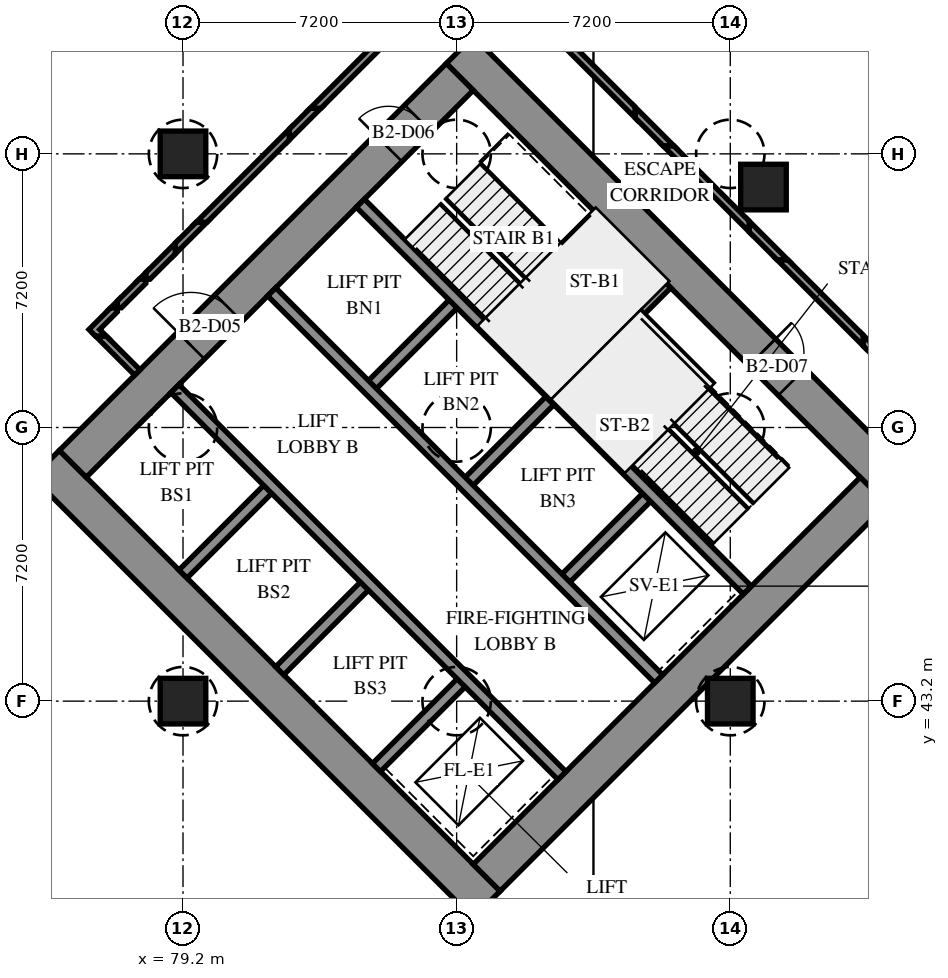
"""IFC4 building model, lengths in metres.
Left out: names, types, materials, properties, quantities, classifications, styles, units other than length and angle.
Written with IfcOpenShell. Run it as: python <this file> out.ifc"""

import sys

from ifc_helpers import new_model, si_unit, direction, frame, frame_2d, origin, origin_2d, place, context, subcontext, project, spatial, polyline, rectangle, outline, extrude, element, fill, save


model = new_model("IFC4")
c1 = context("Model", 3, precision=1e-05, world=origin(), true_north=direction((0.0, 1.0)))
c2 = subcontext(c1, "Body", "Model", "MODEL_VIEW")
j1 = project(units=[si_unit("LENGTHUNIT", "METRE"), si_unit("PLANEANGLEUNIT", "RADIAN")], contexts=[c1])
p1 = place(None, origin())
s1 = spatial("IfcSite", under=j1, at=p1, CompositionType="ELEMENT")
p2 = place(p1, origin())
s2 = spatial("IfcBuilding", under=s1, at=p2, CompositionType="ELEMENT")
p3 = place(p2, frame((0.0, 0.0, -9.0)))
s3 = spatial("IfcBuildingStorey", under=s2, at=p3, CompositionType="ELEMENT", Elevation=-9.0)
p4 = place(p3, frame((0.0, 0.0, -0.3)))
e1 = element("IfcWall", 1, at=p4, inside=s3, PredefinedType="SOLIDWALL", context=c2, shape_type="SweptSolid", body=[
    extrude(outline(polyline([(125.02, 34.665), (81.685, 78.0), (81.934, 78.6), (125.869, 34.665), (125.02, 34.665)])), origin(), (0.0, 0.0, 1.0), 4.5),
])
for number, where, z_axis, x_axis in (
    (2, (79.2, 43.2, 0.0), (0.0, 0.0, 1.0), (1.0, 0.0, 0.0)),
    (3, (79.2, 57.6, 0.0), (0.0, 0.0, 1.0), (1.0, 0.0, 0.0)),
    (4, (94.474, 56.727, 0.0), (0.0, 0.0, 1.0), (1.0, 0.0, 0.0)),
    (5, (93.6, 43.2, 0.0), (0.0, 0.0, 1.0), (1.0, 0.0, 0.0)),
):
    element("IfcColumn", number, at=place(p3, frame(where, z_axis=z_axis, x_axis=x_axis)), inside=s3, PredefinedType="COLUMN", context=c2, shape_type="SweptSolid", body=[
        extrude(rectangle(XDim=1.2, YDim=1.2, at=origin_2d()), origin(), (0.0, 0.0, 1.0), 4.2),
    ])
p5 = place(p3, frame((75.594, 49.443, -0.3), z_axis=(0.0, 0.0, 1.0), x_axis=(0.7071037324, -0.70710983, 0.0)))
e6 = element("IfcWall", 6, at=p5, inside=s3, PredefinedType="SHEAR", context=c2, shape_type="SweptSolid", body=[
    extrude(rectangle(XDim=16.4, YDim=1.0, at=frame_2d((8.2, 0.0))), origin(), (0.0, 0.0, 1.0), 3.8),
])
p6 = place(p3, frame((86.483, 60.333, -0.3), z_axis=(0.0, 0.0, 1.0), x_axis=(0.70710983, -0.7071037324, 0.0)))
e7 = element("IfcWall", 7, at=p6, inside=s3, PredefinedType="SHEAR", context=c2, shape_type="SweptSolid", body=[
    extrude(rectangle(XDim=16.4, YDim=1.0, at=frame_2d((8.2, 0.0))), origin(), (0.0, 0.0, 1.0), 3.8),
])
p7 = place(p6, frame((11.25, 0.0, 0.3)))
e8 = element("IfcOpeningElement", 8, at=p7, cuts=e7, PredefinedType="OPENING", context=c2, shape_type="SweptSolid", body=[
    extrude(rectangle(XDim=1.1, YDim=2.1, at=frame_2d((0.55, 1.05))), frame((0.0, 0.51, 0.0), z_axis=(0.0, -1.0, 0.0), x_axis=(1.0, 0.0, 0.0)), (0.0, 0.0, 1.0), 1.02),
])
p8 = place(p3, frame((76.301, 49.443, -0.3), z_axis=(0.0, 0.0, 1.0), x_axis=(0.7071067812, 0.7071067812, 0.0)))
e9 = element("IfcWall", 9, at=p8, inside=s3, PredefinedType="SHEAR", context=c2, shape_type="SweptSolid", body=[
    extrude(rectangle(XDim=14.4, YDim=1.0, at=frame_2d((7.2, 0.0))), origin(), (0.0, 0.0, 1.0), 3.8),
])
p9 = place(p8, frame((4.4, 0.0, 0.3)))
e10 = element("IfcOpeningElement", 10, at=p9, cuts=e9, PredefinedType="OPENING", context=c2, shape_type="SweptSolid", body=[
    extrude(rectangle(XDim=1.4, YDim=2.1, at=frame_2d((0.7, 1.05))), frame((0.0, 0.51, 0.0), z_axis=(0.0, -1.0, 0.0), x_axis=(1.0, 0.0, 0.0)), (0.0, 0.0, 1.0), 1.02),
])
p10 = place(p8, frame((11.75, 0.0, 0.3)))
e11 = element("IfcOpeningElement", 11, at=p10, cuts=e9, PredefinedType="OPENING", context=c2, shape_type="SweptSolid", body=[
    extrude(rectangle(XDim=1.1, YDim=2.1, at=frame_2d((0.55, 1.05))), frame((0.0, 0.51, 0.0), z_axis=(0.0, -1.0, 0.0), x_axis=(1.0, 0.0, 0.0)), (0.0, 0.0, 1.0), 1.02),
])
p11 = place(p3, frame((87.19, 38.554, -0.3), z_axis=(0.0, 0.0, 1.0), x_axis=(0.707103309, 0.7071102534, 0.0)))
e12 = element("IfcWall", 12, at=p11, inside=s3, PredefinedType="SHEAR", context=c2, shape_type="SweptSolid", body=[
    extrude(rectangle(XDim=14.4, YDim=1.0, at=frame_2d((7.2, 0.0))), origin(), (0.0, 0.0, 1.0), 3.8),
])
for number, where, z_axis, x_axis in (
    (13, (79.2, 46.544, 0.0), (0.0, 0.0, 1.0), (0.707, 0.707, 0.0)),
    (14, (84.079, 51.423, 0.0), (0.0, 0.0, 1.0), (0.707, 0.707, 0.0)),
):
    element("IfcWall", number, at=place(p3, frame(where, z_axis=z_axis, x_axis=x_axis)), inside=s3, PredefinedType="SOLIDWALL", context=c2, shape_type="SweptSolid", body=[
        extrude(rectangle(XDim=3.3, YDim=0.3, at=frame_2d((1.65, 0.0))), origin(), (0.0, 0.0, 1.0), 4.2),
    ])
p12 = place(p3, frame((81.746, 43.999, 0.0), z_axis=(0.0, 0.0, 1.0), x_axis=(0.7071067812, 0.7071067812, 0.0)))
e15 = element("IfcWall", 15, at=p12, inside=s3, PredefinedType="SOLIDWALL", context=c2, shape_type="SweptSolid", body=[
    extrude(rectangle(XDim=3.3, YDim=0.3, at=frame_2d((1.65, 0.0))), origin(), (0.0, 0.0, 1.0), 4.2),
])
p13 = place(p3, frame((86.625, 48.878, 0.0), z_axis=(0.0, 0.0, 1.0), x_axis=(0.7071067812, 0.7071067812, 0.0)))
e16 = element("IfcWall", 16, at=p13, inside=s3, PredefinedType="SOLIDWALL", context=c2, shape_type="SweptSolid", body=[
    extrude(rectangle(XDim=3.3, YDim=0.3, at=frame_2d((1.65, 0.0))), origin(), (0.0, 0.0, 1.0), 4.2),
])
p14 = place(p3, frame((84.291, 41.453, 0.0), z_axis=(0.0, 0.0, 1.0), x_axis=(0.7071067812, 0.7071067812, 0.0)))
e17 = element("IfcWall", 17, at=p14, inside=s3, PredefinedType="SOLIDWALL", context=c2, shape_type="SweptSolid", body=[
    extrude(rectangle(XDim=3.3, YDim=0.3, at=frame_2d((1.65, 0.0))), origin(), (0.0, 0.0, 1.0), 4.2),
])
p15 = place(p3, frame((89.17, 46.332, 0.0), z_axis=(0.0, 0.0, 1.0), x_axis=(0.7071067812, 0.7071067812, 0.0)))
e18 = element("IfcWall", 18, at=p15, inside=s3, PredefinedType="SOLIDWALL", context=c2, shape_type="SweptSolid", body=[
    extrude(rectangle(XDim=3.3, YDim=0.3, at=frame_2d((1.65, 0.0))), origin(), (0.0, 0.0, 1.0), 4.2),
])
p16 = place(p3, frame((78.988, 51.423, 0.0), z_axis=(0.0, 0.0, 1.0), x_axis=(0.7071067812, -0.7071067812, 0.0)))
e19 = element("IfcWall", 19, at=p16, inside=s3, PredefinedType="SOLIDWALL", context=c2, shape_type="SweptSolid", body=[
    extrude(rectangle(XDim=14.4, YDim=0.3, at=frame_2d((7.2, 0.0))), origin(), (0.0, 0.0, 1.0), 4.2),
])
p17 = place(p3, frame((81.534, 53.969, 0.0), z_axis=(0.0, 0.0, 1.0), x_axis=(0.707103309, -0.7071102534, 0.0)))
e20 = element("IfcWall", 20, at=p17, inside=s3, PredefinedType="SOLIDWALL", context=c2, shape_type="SweptSolid", body=[
    extrude(rectangle(XDim=14.4, YDim=0.3, at=frame_2d((7.2, 0.0))), origin(), (0.0, 0.0, 1.0), 4.2),
])
for number, where, z_axis, x_axis in (
    (21, (83.867, 56.302, 0.0), (0.0, 0.0, 1.0), (0.707, -0.707, 0.0)),
    (22, (88.958, 51.211, 0.0), (0.0, 0.0, 1.0), (0.707, -0.707, 0.0)),
):
    element("IfcWall", number, at=place(p3, frame(where, z_axis=z_axis, x_axis=x_axis)), inside=s3, PredefinedType="SOLIDWALL", context=c2, shape_type="SweptSolid", body=[
        extrude(rectangle(XDim=7.2, YDim=0.3, at=frame_2d((3.6, 0.0))), origin(), (0.0, 0.0, 1.0), 4.2),
    ])
p18 = place(p3, frame((88.958, 51.211, 0.0), z_axis=(0.0, 0.0, 1.0), x_axis=(0.7071067812, 0.7071067812, 0.0)))
e23 = element("IfcWall", 23, at=p18, inside=s3, PredefinedType="SOLIDWALL", context=c2, shape_type="SweptSolid", body=[
    extrude(rectangle(XDim=4.2, YDim=0.3, at=frame_2d((2.1, 0.0))), origin(), (0.0, 0.0, 1.0), 4.2),
])
p19 = place(p3, frame((82.224, 79.3, -0.3), z_axis=(0.0, 0.0, 1.0), x_axis=(0.7071059906, -0.7071075718, 0.0)))
e24 = element("IfcWall", 24, at=p19, inside=s3, PredefinedType="SOLIDWALL", context=c2, shape_type="SweptSolid", body=[
    extrude(outline(polyline([(0.041, -0.2), (63.2, -0.2), (63.282, 0.2), (-0.041, 0.2), (0.041, -0.2)])), origin(), (0.0, 0.0, 1.0), 4.5),
])
p20 = place(p3, origin())
e25 = element("IfcWall", 25, at=p20, inside=s3, PredefinedType="PARTITIONING", context=c2, shape_type="SweptSolid", body=[
    extrude(outline(polyline([(76.904, 52.8), (77.187, 52.8), (77.008, 52.979), (77.475, 53.446), (77.475, 53.55), (77.296, 53.55), (76.725, 52.979), (76.904, 52.8)])), origin(), (0.0, 0.0, 1.0), 4.2),
])
e26 = element("IfcWall", 26, at=p20, inside=s3, PredefinedType="PARTITIONING", context=c2, shape_type="SweptSolid", body=[
    extrude(outline(polyline([(77.475, 53.729), (77.296, 53.55), (77.475, 53.55), (77.475, 53.729)])), origin(), (0.0, 0.0, 1.0), 4.2),
])
e27 = element("IfcWall", 27, at=p20, inside=s3, PredefinedType="PARTITIONING", context=c2, shape_type="SweptSolid", body=[
    extrude(outline(polyline([(77.927, 51.777), (78.069, 51.918), (77.187, 52.8), (76.904, 52.8), (77.927, 51.777)])), origin(), (0.0, 0.0, 1.0), 4.2),
])
e28 = element("IfcWall", 28, at=p20, inside=s3, PredefinedType="PARTITIONING", context=c2, shape_type="SweptSolid", body=[
    extrude(outline(polyline([(78.046, 54.3), (77.475, 53.729), (77.475, 53.55), (77.579, 53.55), (78.225, 54.196), (78.225, 54.3), (78.046, 54.3)])), origin(), (0.0, 0.0, 1.0), 4.2),
])
e29 = element("IfcWall", 29, at=p20, inside=s3, PredefinedType="PARTITIONING", context=c2, shape_type="SweptSolid", body=[
    extrude(outline(polyline([(78.225, 54.479), (78.046, 54.3), (78.225, 54.3), (78.225, 54.479)])), origin(), (0.0, 0.0, 1.0), 4.2),
])
e30 = element("IfcWall", 30, at=p20, inside=s3, PredefinedType="PARTITIONING", context=c2, shape_type="SweptSolid", body=[
    extrude(outline(polyline([(79.0, 55.254), (78.225, 54.479), (78.225, 54.3), (78.329, 54.3), (79.0, 54.971), (79.0, 55.254)])), origin(), (0.0, 0.0, 1.0), 4.2),
])
e31 = element("IfcWall", 31, at=p20, inside=s3, PredefinedType="PARTITIONING", context=c2, shape_type="SweptSolid", body=[
    extrude(outline(polyline([(79.0, 54.971), (79.829, 55.8), (79.546, 55.8), (79.0, 55.254), (79.0, 54.971)])), origin(), (0.0, 0.0, 1.0), 4.2),
])
e32 = element("IfcWall", 32, at=p20, inside=s3, PredefinedType="PARTITIONING", context=c2, shape_type="SweptSolid", body=[
    extrude(outline(polyline([(79.829, 55.8), (82.0, 57.971), (82.0, 58.254), (79.546, 55.8), (79.829, 55.8)])), origin(), (0.0, 0.0, 1.0), 4.2),
])
e33 = element("IfcWall", 33, at=p20, inside=s3, PredefinedType="PARTITIONING", context=c2, shape_type="SweptSolid", body=[
    extrude(outline(polyline([(82.0, 57.971), (82.829, 58.8), (82.546, 58.8), (82.0, 58.254), (82.0, 57.971)])), origin(), (0.0, 0.0, 1.0), 4.2),
])
e34 = element("IfcWall", 34, at=p20, inside=s3, PredefinedType="PARTITIONING", context=c2, shape_type="SweptSolid", body=[
    extrude(outline(polyline([(82.829, 58.8), (85.0, 60.971), (85.0, 61.254), (82.546, 58.8), (82.829, 58.8)])), origin(), (0.0, 0.0, 1.0), 4.2),
])
e35 = element("IfcWall", 35, at=p20, inside=s3, PredefinedType="PARTITIONING", context=c2, shape_type="SweptSolid", body=[
    extrude(outline(polyline([(91.1, 58.827), (89.12, 60.807), (88.838, 60.807), (91.1, 58.544), (91.1, 58.827)])), origin(), (0.0, 0.0, 1.0), 4.2),
])
e36 = element("IfcWall", 36, at=p20, inside=s3, PredefinedType="PARTITIONING", context=c2, shape_type="SweptSolid", body=[
    extrude(outline(polyline([(92.12, 57.807), (91.1, 58.827), (91.1, 58.544), (91.838, 57.807), (92.12, 57.807)])), origin(), (0.0, 0.0, 1.0), 4.2),
])
e37 = element("IfcWall", 37, at=p20, inside=s3, PredefinedType="PARTITIONING", context=c2, shape_type="SweptSolid", body=[
    extrude(outline(polyline([(94.1, 55.827), (92.12, 57.807), (91.838, 57.807), (94.1, 55.544), (94.1, 55.827)])), origin(), (0.0, 0.0, 1.0), 4.2),
])
e38 = element("IfcWall", 38, at=p20, inside=s3, PredefinedType="PARTITIONING", context=c2, shape_type="SweptSolid", body=[
    extrude(outline(polyline([(95.12, 54.807), (94.1, 55.827), (94.1, 55.544), (94.838, 54.807), (95.12, 54.807)])), origin(), (0.0, 0.0, 1.0), 4.2),
])
e39 = element("IfcWall", 39, at=p20, inside=s3, PredefinedType="PARTITIONING", context=c2, shape_type="SweptSolid", body=[
    extrude(outline(polyline([(97.1, 52.827), (95.12, 54.807), (94.838, 54.807), (97.1, 52.544), (97.1, 52.827)])), origin(), (0.0, 0.0, 1.0), 4.2),
])
e40 = element("IfcWall", 40, at=p20, inside=s3, PredefinedType="PARTITIONING", context=c2, shape_type="SweptSolid", body=[
    extrude(outline(polyline([(98.12, 51.807), (97.1, 52.827), (97.1, 52.544), (97.838, 51.807), (98.12, 51.807)])), origin(), (0.0, 0.0, 1.0), 4.2),
])
p21 = place(p9, origin())
e41 = element("IfcDoor", 41, at=p21, inside=s3, OperationType="SINGLE_SWING_RIGHT", PredefinedType="DOOR", context=c2, shape_type="SweptSolid", body=[
    extrude(rectangle(XDim=1.4, YDim=2.1, at=frame_2d((0.7, 1.05))), frame((0.0, 0.025, 0.0), z_axis=(0.0, -1.0, 0.0), x_axis=(1.0, 0.0, 0.0)), (0.0, 0.0, 1.0), 0.05),
])
fill(e10, e41)
p22 = place(p10, origin())
e42 = element("IfcDoor", 42, at=p22, inside=s3, OperationType="SINGLE_SWING_LEFT", PredefinedType="DOOR", context=c2, shape_type="SweptSolid", body=[
    extrude(rectangle(XDim=1.1, YDim=2.1, at=frame_2d((0.55, 1.05))), frame((0.0, 0.025, 0.0), z_axis=(0.0, -1.0, 0.0), x_axis=(1.0, 0.0, 0.0)), (0.0, 0.0, 1.0), 0.05),
])
fill(e11, e42)
p23 = place(p7, origin())
e43 = element("IfcDoor", 43, at=p23, inside=s3, OperationType="SINGLE_SWING_RIGHT", PredefinedType="DOOR", context=c2, shape_type="SweptSolid", body=[
    extrude(rectangle(XDim=1.1, YDim=2.1, at=frame_2d((0.55, 1.05))), frame((0.0, 0.025, 0.0), z_axis=(0.0, -1.0, 0.0), x_axis=(1.0, 0.0, 0.0)), (0.0, 0.0, 1.0), 0.05),
])
fill(e8, e43)
save(model, sys.argv[1])
